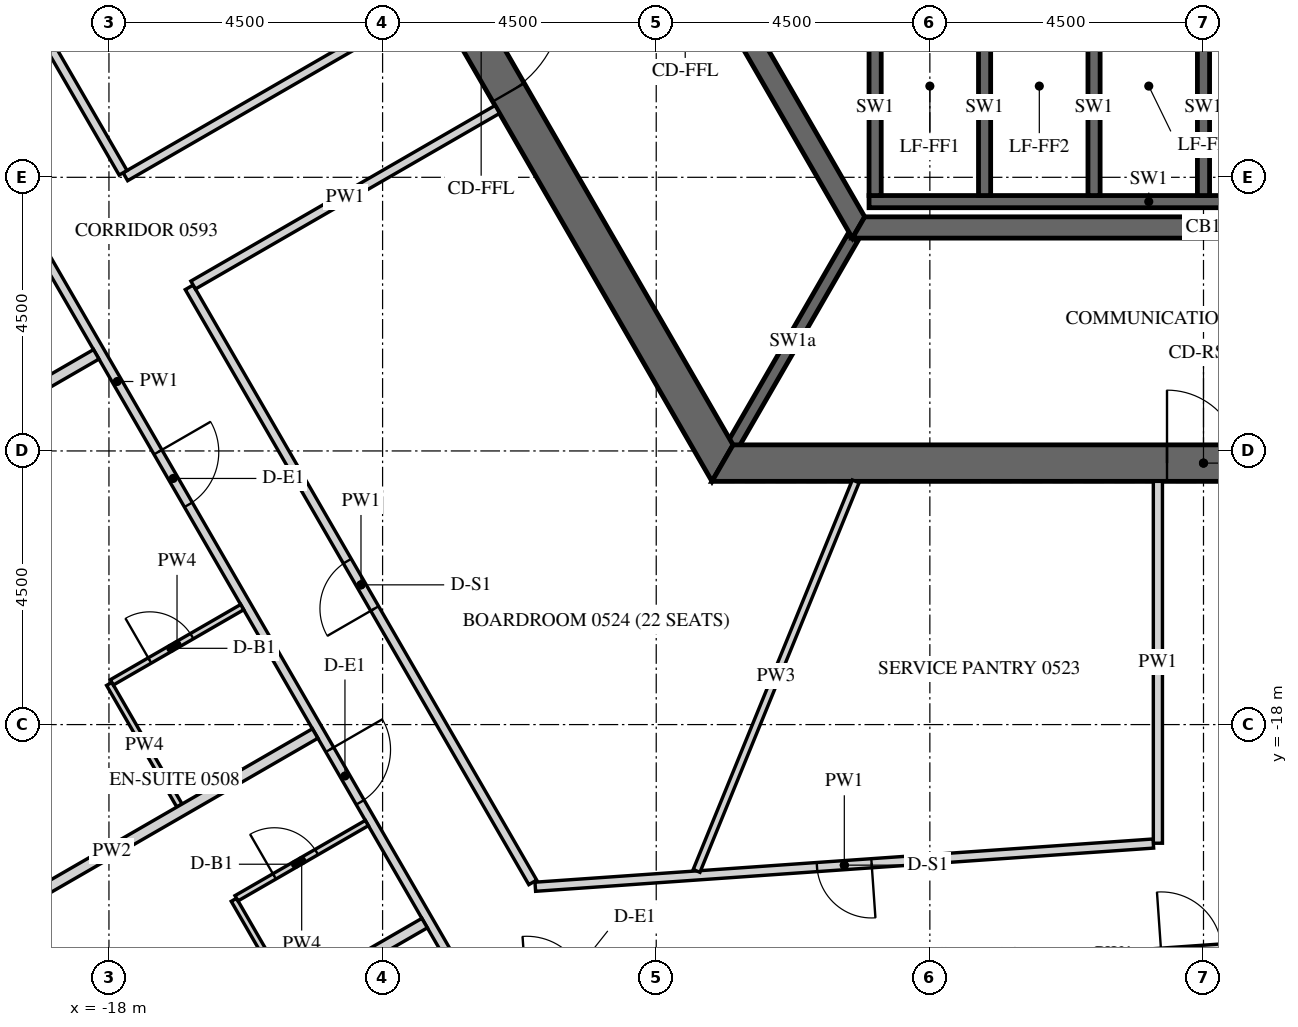
"""IFC4 building model, lengths in metres.
Left out: names, types, materials, properties, quantities, classifications, styles, units other than length and angle.
Written with IfcOpenShell. Run it as: python <this file> out.ifc"""

import sys

from ifc_helpers import new_model, si_unit, direction, frame, frame_2d, origin, place, context, subcontext, project, spatial, polyline, rectangle, outline, extrude, element, fill, save


model = new_model("IFC4")
c1 = context("Model", 3, precision=1e-05, world=origin(), true_north=direction((0.0, 1.0)))
c2 = subcontext(c1, "Body", "Model", "MODEL_VIEW")
j1 = project(units=[si_unit("LENGTHUNIT", "METRE"), si_unit("PLANEANGLEUNIT", "RADIAN")], contexts=[c1])
p1 = place(None, origin())
s1 = spatial("IfcSite", under=j1, at=p1, CompositionType="ELEMENT")
p2 = place(p1, origin())
s2 = spatial("IfcBuilding", under=s1, at=p2, CompositionType="ELEMENT")
p3 = place(p2, frame((0.0, 0.0, 80.4)))
s3 = spatial("IfcBuildingStorey", under=s2, at=p3, CompositionType="ELEMENT", Elevation=80.4)
p4 = place(p3, frame((-32.655, -2.89, -0.15), z_axis=(0.0, 0.0, 1.0), x_axis=(0.499997711317, -0.866026725152, 0.0)))
e1 = element("IfcWall", 1, at=p4, inside=s3, PredefinedType="SOLIDWALL", context=c2, shape_type="SweptSolid", body=[
    extrude(outline(polyline([(-0.022, -0.275), (30.097, -0.275), (30.045, 0.275), (0.022, 0.275), (-0.022, -0.275)])), origin(), (0.0, 0.0, 1.0), 3.9),
])
p5 = place(p4, frame((1.236, 0.0, 1.05)))
e2 = element("IfcOpeningElement", 2, at=p5, cuts=e1, PredefinedType="OPENING", context=c2, shape_type="SweptSolid", body=[
    extrude(rectangle(XDim=2.4, YDim=2.4, at=frame_2d((1.2, 1.2))), frame((0.0, 0.285, 0.0), z_axis=(0.0, -1.0, 0.0), x_axis=(1.0, 0.0, 0.0)), (0.0, 0.0, 1.0), 0.57),
])
p6 = place(p4, frame((4.835, 0.0, 1.05)))
e3 = element("IfcOpeningElement", 3, at=p6, cuts=e1, PredefinedType="OPENING", context=c2, shape_type="SweptSolid", body=[
    extrude(rectangle(XDim=2.4, YDim=2.4, at=frame_2d((1.2, 1.2))), frame((0.0, 0.285, 0.0), z_axis=(0.0, -1.0, 0.0), x_axis=(1.0, 0.0, 0.0)), (0.0, 0.0, 1.0), 0.57),
])
p7 = place(p4, frame((8.436, 0.0, 1.05)))
e4 = element("IfcOpeningElement", 4, at=p7, cuts=e1, PredefinedType="OPENING", context=c2, shape_type="SweptSolid", body=[
    extrude(rectangle(XDim=2.4, YDim=2.4, at=frame_2d((1.2, 1.2))), frame((0.0, 0.285, 0.0), z_axis=(0.0, -1.0, 0.0), x_axis=(1.0, 0.0, 0.0)), (0.0, 0.0, 1.0), 0.57),
])
p8 = place(p4, frame((12.035, 0.0, 1.05)))
e5 = element("IfcOpeningElement", 5, at=p8, cuts=e1, PredefinedType="OPENING", context=c2, shape_type="SweptSolid", body=[
    extrude(rectangle(XDim=2.4, YDim=2.4, at=frame_2d((1.2, 1.2))), frame((0.0, 0.285, 0.0), z_axis=(0.0, -1.0, 0.0), x_axis=(1.0, 0.0, 0.0)), (0.0, 0.0, 1.0), 0.57),
])
p9 = place(p4, frame((15.635, 0.0, 1.05)))
e6 = element("IfcOpeningElement", 6, at=p9, cuts=e1, PredefinedType="OPENING", context=c2, shape_type="SweptSolid", body=[
    extrude(rectangle(XDim=2.4, YDim=2.4, at=frame_2d((1.2, 1.2))), frame((0.0, 0.285, 0.0), z_axis=(0.0, -1.0, 0.0), x_axis=(1.0, 0.0, 0.0)), (0.0, 0.0, 1.0), 0.57),
])
p10 = place(p4, frame((19.236, 0.0, 1.05)))
e7 = element("IfcOpeningElement", 7, at=p10, cuts=e1, PredefinedType="OPENING", context=c2, shape_type="SweptSolid", body=[
    extrude(rectangle(XDim=2.4, YDim=2.4, at=frame_2d((1.2, 1.2))), frame((0.0, 0.285, 0.0), z_axis=(0.0, -1.0, 0.0), x_axis=(1.0, 0.0, 0.0)), (0.0, 0.0, 1.0), 0.57),
])
p11 = place(p4, frame((22.835, 0.0, 1.05)))
e8 = element("IfcOpeningElement", 8, at=p11, cuts=e1, PredefinedType="OPENING", context=c2, shape_type="SweptSolid", body=[
    extrude(rectangle(XDim=2.4, YDim=2.4, at=frame_2d((1.2, 1.2))), frame((0.0, 0.285, 0.0), z_axis=(0.0, -1.0, 0.0), x_axis=(1.0, 0.0, 0.0)), (0.0, 0.0, 1.0), 0.57),
])
p12 = place(p4, frame((26.436, 0.0, 1.05)))
e9 = element("IfcOpeningElement", 9, at=p12, cuts=e1, PredefinedType="OPENING", context=c2, shape_type="SweptSolid", body=[
    extrude(rectangle(XDim=2.4, YDim=2.4, at=frame_2d((1.2, 1.2))), frame((0.0, 0.285, 0.0), z_axis=(0.0, -1.0, 0.0), x_axis=(1.0, 0.0, 0.0)), (0.0, 0.0, 1.0), 0.57),
])
p13 = place(p3, frame((-15.819, 0.0, -0.15), z_axis=(0.0, 0.0, 1.0), x_axis=(0.499999880136, -0.866025472988, 0.0)))
e10 = element("IfcWall", 10, at=p13, inside=s3, PredefinedType="SHEAR", context=c2, shape_type="SweptSolid", body=[
    extrude(outline(polyline([(-0.173, -0.3), (15.993, -0.3), (15.646, 0.3), (0.173, 0.3), (-0.173, -0.3)])), origin(), (0.0, 0.0, 1.0), 3.9),
])
p14 = place(p13, frame((6.981, 0.0, 0.15)))
e11 = element("IfcOpeningElement", 11, at=p14, cuts=e10, PredefinedType="OPENING", context=c2, shape_type="SweptSolid", body=[
    extrude(rectangle(XDim=1.8, YDim=2.4, at=frame_2d((0.9, 1.2))), frame((0.0, 0.31, 0.0), z_axis=(0.0, -1.0, 0.0), x_axis=(1.0, 0.0, 0.0)), (0.0, 0.0, 1.0), 0.62),
])
p15 = place(p3, frame((-7.91, -13.7, -0.15), z_axis=(0.0, 0.0, 1.0), x_axis=(1.0, 0.0, 0.0)))
e12 = element("IfcWall", 12, at=p15, inside=s3, PredefinedType="SHEAR", context=c2, shape_type="SweptSolid", body=[
    extrude(outline(polyline([(-0.173, -0.3), (15.993, -0.3), (15.646, 0.3), (0.173, 0.3), (-0.173, -0.3)])), origin(), (0.0, 0.0, 1.0), 3.9),
])
p16 = place(p15, frame((7.31, 0.0, 0.15)))
e13 = element("IfcOpeningElement", 13, at=p16, cuts=e12, PredefinedType="OPENING", context=c2, shape_type="SweptSolid", body=[
    extrude(rectangle(XDim=1.2, YDim=2.4, at=frame_2d((0.6, 1.2))), frame((0.0, 0.31, 0.0), z_axis=(0.0, -1.0, 0.0), x_axis=(1.0, 0.0, 0.0)), (0.0, 0.0, 1.0), 0.62),
])
p17 = place(p3, frame((-11.345, 0.0, -0.15), z_axis=(0.0, 0.0, 1.0), x_axis=(0.499995046907, -0.866028263435, 0.0)))
e14 = element("IfcWall", 14, at=p17, inside=s3, PredefinedType="SHEAR", context=c2, shape_type="SweptSolid", body=[
    extrude(outline(polyline([(-0.101, -0.175), (11.446, -0.175), (11.244, 0.175), (0.101, 0.175), (-0.101, -0.175)])), origin(), (0.0, 0.0, 1.0), 3.9),
])
p18 = place(p17, frame((4.744, 0.0, 0.15)))
e15 = element("IfcOpeningElement", 15, at=p18, cuts=e14, PredefinedType="OPENING", context=c2, shape_type="SweptSolid", body=[
    extrude(rectangle(XDim=1.8, YDim=2.4, at=frame_2d((0.9, 1.2))), frame((0.0, 0.185, 0.0), z_axis=(0.0, -1.0, 0.0), x_axis=(1.0, 0.0, 0.0)), (0.0, 0.0, 1.0), 0.37),
])
p19 = place(p3, frame((-5.673, -9.825, -0.15), z_axis=(0.0, 0.0, 1.0), x_axis=(1.0, 0.0, 0.0)))
e16 = element("IfcWall", 16, at=p19, inside=s3, PredefinedType="SHEAR", context=c2, shape_type="SweptSolid", body=[
    extrude(outline(polyline([(-0.101, -0.175), (11.446, -0.175), (11.244, 0.175), (0.101, 0.175), (-0.101, -0.175)])), origin(), (0.0, 0.0, 1.0), 3.9),
])
p20 = place(p3, frame((-5.5, -9.4, -0.25), z_axis=(0.0, 0.0, 1.0), x_axis=(1.0, 0.0, 0.0)))
e17 = element("IfcWall", 17, at=p20, inside=s3, PredefinedType="SHEAR", context=c2, shape_type="SweptSolid", body=[
    extrude(rectangle(XDim=9.2, YDim=0.2, at=frame_2d((4.6, 0.0))), origin(), (0.0, 0.0, 1.0), 3.9),
])
for number, where, z_axis, x_axis in (
    (18, (-5.4, -9.3, -0.25), (0.0, 0.0, 1.0), (0.0, 1.0, 0.0)),
    (19, (-3.6, -9.3, -0.25), (0.0, 0.0, 1.0), (0.0, 1.0, 0.0)),
    (20, (-1.8, -9.3, -0.25), (0.0, 0.0, 1.0), (0.0, 1.0, 0.0)),
    (21, (0.0, -9.3, -0.25), (0.0, 0.0, 1.0), (0.0, 1.0, 0.0)),
):
    element("IfcWall", number, at=place(p3, frame(where, z_axis=z_axis, x_axis=x_axis)), inside=s3, PredefinedType="SHEAR", context=c2, shape_type="SweptSolid", body=[
        extrude(rectangle(XDim=2.9, YDim=0.2, at=frame_2d((1.45, 0.0))), origin(), (0.0, 0.0, 1.0), 3.9),
    ])
p21 = place(p3, frame((-5.773, -10.0, -0.15), z_axis=(0.0, 0.0, 1.0), x_axis=(-0.500038251005, -0.86600331843, 0.0)))
e22 = element("IfcWall", 22, at=p21, inside=s3, PredefinedType="SHEAR", context=c2, shape_type="SweptSolid", body=[
    extrude(rectangle(XDim=3.926, YDim=0.2, at=frame_2d((1.963, 0.0))), origin(), (0.0, 0.0, 1.0), 3.9),
])
p22 = place(p3, frame((-23.743, -2.175, 0.0), z_axis=(0.0, 0.0, 1.0), x_axis=(0.499992353047, -0.86602981871, 0.0)))
e23 = element("IfcWall", 23, at=p22, inside=s3, PredefinedType="PARTITIONING", context=c2, shape_type="SweptSolid", body=[
    extrude(rectangle(XDim=23.516, YDim=0.15, at=frame_2d((11.758, 0.0))), origin(), (0.0, 0.0, 1.0), 2.988),
])
p23 = place(p22, frame((6.256, 0.0, 0.0)))
e24 = element("IfcOpeningElement", 24, at=p23, cuts=e23, PredefinedType="OPENING", context=c2, shape_type="SweptSolid", body=[
    extrude(rectangle(XDim=1.0, YDim=2.1, at=frame_2d((0.5, 1.05))), frame((0.0, 0.085, 0.0), z_axis=(0.0, -1.0, 0.0), x_axis=(1.0, 0.0, 0.0)), (0.0, 0.0, 1.0), 0.17),
])
p24 = place(p22, frame((13.099, 0.0, 0.0)))
e25 = element("IfcOpeningElement", 25, at=p24, cuts=e23, PredefinedType="OPENING", context=c2, shape_type="SweptSolid", body=[
    extrude(rectangle(XDim=1.0, YDim=2.1, at=frame_2d((0.5, 1.05))), frame((0.0, 0.085, 0.0), z_axis=(0.0, -1.0, 0.0), x_axis=(1.0, 0.0, 0.0)), (0.0, 0.0, 1.0), 0.17),
])
p25 = place(p22, frame((18.749, 0.0, 0.0)))
e26 = element("IfcOpeningElement", 26, at=p25, cuts=e23, PredefinedType="OPENING", context=c2, shape_type="SweptSolid", body=[
    extrude(rectangle(XDim=1.0, YDim=2.1, at=frame_2d((0.5, 1.05))), frame((0.0, 0.085, 0.0), z_axis=(0.0, -1.0, 0.0), x_axis=(1.0, 0.0, 0.0)), (0.0, 0.0, 1.0), 0.17),
])
p26 = place(p3, frame((-11.902, -22.535, 0.0), z_axis=(0.0, 0.0, 1.0), x_axis=(0.997564081796, 0.069756022752, 0.0)))
e27 = element("IfcWall", 27, at=p26, inside=s3, PredefinedType="PARTITIONING", context=c2, shape_type="SweptSolid", body=[
    extrude(rectangle(XDim=21.668, YDim=0.15, at=frame_2d((10.834, 0.0))), origin(), (0.0, 0.0, 1.0), 2.988),
])
p27 = place(p26, frame((0.775, 0.0, 0.0)))
e28 = element("IfcOpeningElement", 28, at=p27, cuts=e27, PredefinedType="OPENING", context=c2, shape_type="SweptSolid", body=[
    extrude(rectangle(XDim=1.0, YDim=2.1, at=frame_2d((0.5, 1.05))), frame((0.0, 0.085, 0.0), z_axis=(0.0, -1.0, 0.0), x_axis=(1.0, 0.0, 0.0)), (0.0, 0.0, 1.0), 0.17),
])
p28 = place(p26, frame((11.234, 0.0, 0.0)))
e29 = element("IfcOpeningElement", 29, at=p28, cuts=e27, PredefinedType="OPENING", context=c2, shape_type="SweptSolid", body=[
    extrude(rectangle(XDim=1.0, YDim=2.1, at=frame_2d((0.5, 1.05))), frame((0.0, 0.085, 0.0), z_axis=(0.0, -1.0, 0.0), x_axis=(1.0, 0.0, 0.0)), (0.0, 0.0, 1.0), 0.17),
])
p29 = place(p26, frame((19.451, 0.0, 0.0)))
e30 = element("IfcOpeningElement", 30, at=p29, cuts=e27, PredefinedType="OPENING", context=c2, shape_type="SweptSolid", body=[
    extrude(rectangle(XDim=1.0, YDim=2.1, at=frame_2d((0.5, 1.05))), frame((0.0, 0.085, 0.0), z_axis=(0.0, -1.0, 0.0), x_axis=(1.0, 0.0, 0.0)), (0.0, 0.0, 1.0), 0.17),
])
p30 = place(p3, frame((-12.664, -6.066, 0.0), z_axis=(0.0, 0.0, 1.0), x_axis=(-0.866018092707, -0.500012662943, 0.0)))
e31 = element("IfcWall", 31, at=p30, inside=s3, PredefinedType="PARTITIONING", context=c2, shape_type="SweptSolid", body=[
    extrude(rectangle(XDim=5.85, YDim=0.15, at=frame_2d((2.925, 0.0))), origin(), (0.0, 0.0, 1.0), 2.988),
])
p31 = place(p3, frame((-17.768, -8.926, 0.0), z_axis=(0.0, 0.0, 1.0), x_axis=(-0.499997033681, 0.866027116383, 0.0)))
e32 = element("IfcWall", 32, at=p31, inside=s3, PredefinedType="PARTITIONING", context=c2, shape_type="SweptSolid", body=[
    extrude(rectangle(XDim=8.235, YDim=0.15, at=frame_2d((4.118, 0.0))), origin(), (0.0, 0.0, 1.0), 2.988),
])
p32 = place(p31, frame((3.668, 0.0, 0.0)))
e33 = element("IfcOpeningElement", 33, at=p32, cuts=e32, PredefinedType="OPENING", context=c2, shape_type="SweptSolid", body=[
    extrude(rectangle(XDim=0.9, YDim=2.1, at=frame_2d((0.45, 1.05))), frame((0.0, 0.085, 0.0), z_axis=(0.0, -1.0, 0.0), x_axis=(1.0, 0.0, 0.0)), (0.0, 0.0, 1.0), 0.17),
])
p33 = place(p3, frame((-0.75, -14.0, 0.0), z_axis=(0.0, 0.0, 1.0), x_axis=(0.0, -1.0, 0.0)))
e34 = element("IfcWall", 34, at=p33, inside=s3, PredefinedType="PARTITIONING", context=c2, shape_type="SweptSolid", body=[
    extrude(rectangle(XDim=5.951, YDim=0.15, at=frame_2d((2.976, 0.0))), origin(), (0.0, 0.0, 1.0), 2.988),
])
p34 = place(p3, frame((-0.825, -19.956, 0.0), z_axis=(0.0, 0.0, 1.0), x_axis=(-0.997562587881, -0.069777383582, 0.0)))
e35 = element("IfcWall", 35, at=p34, inside=s3, PredefinedType="PARTITIONING", context=c2, shape_type="SweptSolid", body=[
    extrude(rectangle(XDim=10.189, YDim=0.15, at=frame_2d((5.094, 0.0))), origin(), (0.0, 0.0, 1.0), 2.988),
])
p35 = place(p34, frame((4.644, 0.0, 0.0)))
e36 = element("IfcOpeningElement", 36, at=p35, cuts=e35, PredefinedType="OPENING", context=c2, shape_type="SweptSolid", body=[
    extrude(rectangle(XDim=0.9, YDim=2.1, at=frame_2d((0.45, 1.05))), frame((0.0, 0.085, 0.0), z_axis=(0.0, -1.0, 0.0), x_axis=(1.0, 0.0, 0.0)), (0.0, 0.0, 1.0), 0.17),
])
p36 = place(p3, frame((-11.031, -20.595, 0.0), z_axis=(0.0, 0.0, 1.0), x_axis=(-0.499987422378, 0.866032665356, 0.0)))
e37 = element("IfcWall", 37, at=p36, inside=s3, PredefinedType="PARTITIONING", context=c2, shape_type="SweptSolid", body=[
    extrude(rectangle(XDim=11.299, YDim=0.15, at=frame_2d((5.649, 0.0))), origin(), (0.0, 0.0, 1.0), 2.988),
])
p37 = place(p36, frame((5.199, 0.0, 0.0)))
e38 = element("IfcOpeningElement", 38, at=p37, cuts=e37, PredefinedType="OPENING", context=c2, shape_type="SweptSolid", body=[
    extrude(rectangle(XDim=0.9, YDim=2.1, at=frame_2d((0.45, 1.05))), frame((0.0, 0.085, 0.0), z_axis=(0.0, -1.0, 0.0), x_axis=(1.0, 0.0, 0.0)), (0.0, 0.0, 1.0), 0.17),
])
p38 = place(p3, frame((-16.615, -10.772, 0.0), z_axis=(0.0, 0.0, 1.0), x_axis=(0.866025774745, 0.499999357477, 0.0)))
e39 = element("IfcWall", 39, at=p38, inside=s3, PredefinedType="PARTITIONING", context=c2, shape_type="SweptSolid", body=[
    extrude(rectangle(XDim=5.775, YDim=0.15, at=frame_2d((2.887, 0.0))), origin(), (0.0, 0.0, 1.0), 2.988),
])
p39 = place(p3, frame((-24.899, -15.774, 0.0), z_axis=(0.0, 0.0, 1.0), x_axis=(0.866032958989, 0.499986913773, 0.0)))
e40 = element("IfcWall", 40, at=p39, inside=s3, PredefinedType="PARTITIONING", context=c2, shape_type="SweptSolid", body=[
    extrude(rectangle(XDim=7.725, YDim=0.18, at=frame_2d((3.862, 0.0))), origin(), (0.0, 0.0, 1.0), 2.988),
])
p40 = place(p3, frame((-16.841, -19.331, 0.0), z_axis=(0.0, 0.0, 1.0), x_axis=(-0.500015210774, 0.866016621662, 0.0)))
e41 = element("IfcWall", 41, at=p40, inside=s3, PredefinedType="PARTITIONING", context=c2, shape_type="SweptSolid", body=[
    extrude(rectangle(XDim=2.31, YDim=0.1, at=frame_2d((1.155, 0.0))), origin(), (0.0, 0.0, 1.0), 2.988),
])
p41 = place(p3, frame((-17.952, -17.306, 0.0), z_axis=(0.0, 0.0, 1.0), x_axis=(0.866031185235, 0.4999899861, 0.0)))
e42 = element("IfcWall", 42, at=p41, inside=s3, PredefinedType="PARTITIONING", context=c2, shape_type="SweptSolid", body=[
    extrude(rectangle(XDim=2.475, YDim=0.1, at=frame_2d((1.238, 0.0))), origin(), (0.0, 0.0, 1.0), 2.988),
])
p42 = place(p41, frame((0.72, 0.0, 0.0)))
e43 = element("IfcOpeningElement", 43, at=p42, cuts=e42, PredefinedType="OPENING", context=c2, shape_type="SweptSolid", body=[
    extrude(rectangle(XDim=0.8, YDim=2.1, at=frame_2d((0.4, 1.05))), frame((0.0, 0.06, 0.0), z_axis=(0.0, -1.0, 0.0), x_axis=(1.0, 0.0, 0.0)), (0.0, 0.0, 1.0), 0.12),
])
p43 = place(p3, frame((-21.299, -22.009, 0.0), z_axis=(0.0, 0.0, 1.0), x_axis=(0.866019273868, 0.500010617176, 0.0)))
e44 = element("IfcWall", 44, at=p43, inside=s3, PredefinedType="PARTITIONING", context=c2, shape_type="SweptSolid", body=[
    extrude(rectangle(XDim=7.725, YDim=0.18, at=frame_2d((3.862, 0.0))), origin(), (0.0, 0.0, 1.0), 2.988),
])
p44 = place(p3, frame((-15.041, -22.449, 0.0), z_axis=(0.0, 0.0, 1.0), x_axis=(-0.499983199978, 0.866035103064, 0.0)))
e45 = element("IfcWall", 45, at=p44, inside=s3, PredefinedType="PARTITIONING", context=c2, shape_type="SweptSolid", body=[
    extrude(rectangle(XDim=1.81, YDim=0.1, at=frame_2d((0.905, 0.0))), origin(), (0.0, 0.0, 1.0), 2.988),
])
p45 = place(p3, frame((-15.902, -20.856, 0.0), z_axis=(0.0, 0.0, 1.0), x_axis=(0.866031185235, 0.4999899861, 0.0)))
e46 = element("IfcWall", 46, at=p45, inside=s3, PredefinedType="PARTITIONING", context=c2, shape_type="SweptSolid", body=[
    extrude(rectangle(XDim=2.475, YDim=0.1, at=frame_2d((1.238, 0.0))), origin(), (0.0, 0.0, 1.0), 2.988),
])
p46 = place(p45, frame((0.72, 0.0, 0.0)))
e47 = element("IfcOpeningElement", 47, at=p46, cuts=e46, PredefinedType="OPENING", context=c2, shape_type="SweptSolid", body=[
    extrude(rectangle(XDim=0.8, YDim=2.1, at=frame_2d((0.4, 1.05))), frame((0.0, 0.06, 0.0), z_axis=(0.0, -1.0, 0.0), x_axis=(1.0, 0.0, 0.0)), (0.0, 0.0, 1.0), 0.12),
])
p47 = place(p3, frame((-19.499, -25.127, 0.0), z_axis=(0.0, 0.0, 1.0), x_axis=(0.866027174938, 0.499996932259, 0.0)))
e48 = element("IfcWall", 48, at=p47, inside=s3, PredefinedType="PARTITIONING", context=c2, shape_type="SweptSolid", body=[
    extrude(rectangle(XDim=7.725, YDim=0.18, at=frame_2d((3.863, 0.0))), origin(), (0.0, 0.0, 1.0), 2.988),
])
p48 = place(p3, frame((-5.719, -14.0, 0.0), z_axis=(0.0, 0.0, 1.0), x_axis=(-0.378193217714, -0.925726682166, 0.0)))
e49 = element("IfcWall", 49, at=p48, inside=s3, PredefinedType="PARTITIONING", context=c2, shape_type="SweptSolid", body=[
    extrude(rectangle(XDim=6.92, YDim=0.12, at=frame_2d((3.46, 0.0))), origin(), (0.0, 0.0, 1.0), 2.988),
])
p49 = place(p14, origin())
e50 = element("IfcDoor", 50, at=p49, inside=s3, OperationType="DOUBLE_DOOR_SINGLE_SWING", PredefinedType="DOOR", context=c2, shape_type="SweptSolid", body=[
    extrude(rectangle(XDim=1.8, YDim=2.4, at=frame_2d((0.9, 1.2))), frame((0.0, 0.025, 0.0), z_axis=(0.0, -1.0, 0.0), x_axis=(1.0, 0.0, 0.0)), (0.0, 0.0, 1.0), 0.05),
])
fill(e11, e50)
p50 = place(p16, origin())
e51 = element("IfcDoor", 51, at=p50, inside=s3, OperationType="SINGLE_SWING_LEFT", PredefinedType="DOOR", context=c2, shape_type="SweptSolid", body=[
    extrude(rectangle(XDim=1.2, YDim=2.4, at=frame_2d((0.6, 1.2))), frame((0.0, 0.025, 0.0), z_axis=(0.0, -1.0, 0.0), x_axis=(1.0, 0.0, 0.0)), (0.0, 0.0, 1.0), 0.05),
])
fill(e13, e51)
p51 = place(p24, origin())
e52 = element("IfcDoor", 52, at=p51, inside=s3, OperationType="SINGLE_SWING_LEFT", PredefinedType="DOOR", context=c2, shape_type="SweptSolid", body=[
    extrude(rectangle(XDim=1.0, YDim=2.1, at=frame_2d((0.5, 1.05))), frame((0.0, 0.025, 0.0), z_axis=(0.0, -1.0, 0.0), x_axis=(1.0, 0.0, 0.0)), (0.0, 0.0, 1.0), 0.05),
])
fill(e25, e52)
p52 = place(p42, origin())
e53 = element("IfcDoor", 53, at=p52, inside=s3, OperationType="SINGLE_SWING_RIGHT", PredefinedType="DOOR", context=c2, shape_type="SweptSolid", body=[
    extrude(rectangle(XDim=0.8, YDim=2.1, at=frame_2d((0.4, 1.05))), frame((0.0, 0.025, 0.0), z_axis=(0.0, -1.0, 0.0), x_axis=(1.0, 0.0, 0.0)), (0.0, 0.0, 1.0), 0.05),
])
fill(e43, e53)
p53 = place(p25, origin())
e54 = element("IfcDoor", 54, at=p53, inside=s3, OperationType="SINGLE_SWING_RIGHT", PredefinedType="DOOR", context=c2, shape_type="SweptSolid", body=[
    extrude(rectangle(XDim=1.0, YDim=2.1, at=frame_2d((0.5, 1.05))), frame((0.0, 0.025, 0.0), z_axis=(0.0, -1.0, 0.0), x_axis=(1.0, 0.0, 0.0)), (0.0, 0.0, 1.0), 0.05),
])
fill(e26, e54)
p54 = place(p46, origin())
e55 = element("IfcDoor", 55, at=p54, inside=s3, OperationType="SINGLE_SWING_RIGHT", PredefinedType="DOOR", context=c2, shape_type="SweptSolid", body=[
    extrude(rectangle(XDim=0.8, YDim=2.1, at=frame_2d((0.4, 1.05))), frame((0.0, 0.025, 0.0), z_axis=(0.0, -1.0, 0.0), x_axis=(1.0, 0.0, 0.0)), (0.0, 0.0, 1.0), 0.05),
])
fill(e47, e55)
p55 = place(p28, origin())
e56 = element("IfcDoor", 56, at=p55, inside=s3, OperationType="SINGLE_SWING_LEFT", PredefinedType="DOOR", context=c2, shape_type="SweptSolid", body=[
    extrude(rectangle(XDim=1.0, YDim=2.1, at=frame_2d((0.5, 1.05))), frame((0.0, 0.025, 0.0), z_axis=(0.0, -1.0, 0.0), x_axis=(1.0, 0.0, 0.0)), (0.0, 0.0, 1.0), 0.05),
])
fill(e29, e56)
p56 = place(p35, origin())
e57 = element("IfcDoor", 57, at=p56, inside=s3, OperationType="SINGLE_SWING_LEFT", PredefinedType="DOOR", context=c2, shape_type="SweptSolid", body=[
    extrude(rectangle(XDim=0.9, YDim=2.1, at=frame_2d((0.45, 1.05))), frame((0.0, 0.025, 0.0), z_axis=(0.0, -1.0, 0.0), x_axis=(1.0, 0.0, 0.0)), (0.0, 0.0, 1.0), 0.05),
])
fill(e36, e57)
p57 = place(p37, origin())
e58 = element("IfcDoor", 58, at=p57, inside=s3, OperationType="SINGLE_SWING_RIGHT", PredefinedType="DOOR", context=c2, shape_type="SweptSolid", body=[
    extrude(rectangle(XDim=0.9, YDim=2.1, at=frame_2d((0.45, 1.05))), frame((0.0, 0.025, 0.0), z_axis=(0.0, -1.0, 0.0), x_axis=(1.0, 0.0, 0.0)), (0.0, 0.0, 1.0), 0.05),
])
fill(e38, e58)
save(model, sys.argv[1])
